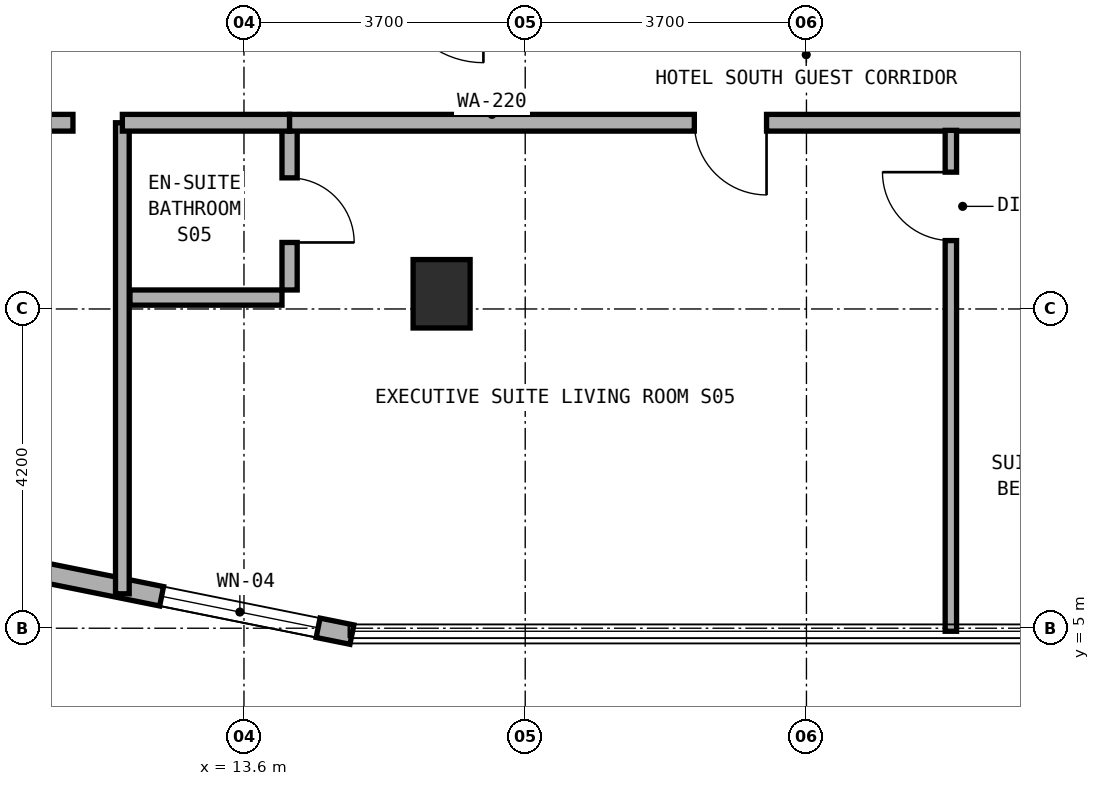
"""IFC4 building model, lengths in metres.
Left out: names, types, materials, properties, quantities, classifications, styles, units other than length and angle.
Written with IfcOpenShell. Run it as: python <this file> out.ifc"""

import sys

from ifc_helpers import new_model, si_unit, direction, frame, frame_2d, origin, origin_2d, place, context, subcontext, project, spatial, rectangle, extrude, element, fill, save


model = new_model("IFC4")
c1 = context("Model", 3, precision=1e-05, world=origin(), true_north=direction((0.0, 1.0)))
c2 = subcontext(c1, "Body", "Model", "MODEL_VIEW")
j1 = project(units=[si_unit("LENGTHUNIT", "METRE"), si_unit("PLANEANGLEUNIT", "RADIAN")], contexts=[c1])
p1 = place(None, origin())
s1 = spatial("IfcSite", under=j1, at=p1, CompositionType="ELEMENT")
p2 = place(p1, origin())
s2 = spatial("IfcBuilding", under=s1, at=p2, CompositionType="ELEMENT")
p3 = place(p2, frame((0.0, 0.0, 159.0)))
s3 = spatial("IfcBuildingStorey", under=s2, at=p3, CompositionType="ELEMENT", Elevation=159.0)
p4 = place(p3, frame((16.2, 9.4, 0.0), z_axis=(0.0, 0.0, 1.0), x_axis=(1.0, 0.0, 0.0)))
e1 = element("IfcColumn", 1, at=p4, inside=s3, PredefinedType="COLUMN", context=c2, shape_type="SweptSolid", body=[
    extrude(rectangle(XDim=0.75, YDim=0.9, at=origin_2d()), origin(), (0.0, 0.0, 1.0), 3.5),
])
p5 = place(p3, frame((6.018, 6.729, 0.0), z_axis=(0.0, 0.0, 1.0), x_axis=(0.980315963543, -0.197435082048, 0.0)))
e2 = element("IfcWall", 2, at=p5, inside=s3, PredefinedType="STANDARD", context=c2, shape_type="SweptSolid", body=[
    extrude(rectangle(XDim=9.183, YDim=0.26, at=frame_2d((4.591, 0.0))), origin(), (0.0, 0.0, 1.0), 3.22),
])
p6 = place(p5, frame((2.211, 0.0, 0.85)))
e3 = element("IfcOpeningElement", 3, at=p6, cuts=e2, PredefinedType="OPENING", context=c2, shape_type="SweptSolid", body=[
    extrude(rectangle(XDim=2.1, YDim=1.5, at=frame_2d((1.05, 0.75))), frame((0.0, 0.14, 0.0), z_axis=(0.0, -1.0, 0.0), x_axis=(1.0, 0.0, 0.0)), (0.0, 0.0, 1.0), 0.28),
])
p7 = place(p5, frame((6.629, 0.0, 0.85)))
e4 = element("IfcOpeningElement", 4, at=p7, cuts=e2, PredefinedType="OPENING", context=c2, shape_type="SweptSolid", body=[
    extrude(rectangle(XDim=2.1, YDim=1.5, at=frame_2d((1.05, 0.75))), frame((0.0, 0.14, 0.0), z_axis=(0.0, -1.0, 0.0), x_axis=(1.0, 0.0, 0.0)), (0.0, 0.0, 1.0), 0.28),
])
p8 = place(p3, frame((6.93, 11.65, 0.0), z_axis=(0.0, 0.0, 1.0), x_axis=(1.0, 0.0, 0.0)))
e5 = element("IfcWall", 5, at=p8, inside=s3, PredefinedType="SOLIDWALL", context=c2, shape_type="SweptSolid", body=[
    extrude(rectangle(XDim=4.42, YDim=0.22, at=frame_2d((2.21, 0.0))), origin(), (0.0, 0.0, 1.0), 2.795),
])
p9 = place(p8, frame((1.484, 0.0, 0.0)))
e6 = element("IfcOpeningElement", 6, at=p9, cuts=e5, PredefinedType="OPENING", context=c2, shape_type="SweptSolid", body=[
    extrude(rectangle(XDim=1.1, YDim=2.1, at=frame_2d((0.55, 1.05))), frame((0.0, 0.12, 0.0), z_axis=(0.0, -1.0, 0.0), x_axis=(1.0, 0.0, 0.0)), (0.0, 0.0, 1.0), 0.24),
])
p10 = place(p3, frame((12.0, 5.453, 0.0), z_axis=(0.0, 0.0, 1.0), x_axis=(0.0, 1.0, 0.0)))
e7 = element("IfcWall", 7, at=p10, inside=s3, PredefinedType="SOLIDWALL", context=c2, shape_type="SweptSolid", body=[
    extrude(rectangle(XDim=6.197, YDim=0.18, at=frame_2d((3.099, 0.0))), origin(), (0.0, 0.0, 1.0), 2.835),
])
p11 = place(p3, frame((14.2, 9.45, 0.0), z_axis=(0.0, 0.0, 1.0), x_axis=(0.0, 1.0, 0.0)))
e8 = element("IfcWall", 8, at=p11, inside=s3, PredefinedType="PLUMBINGWALL", context=c2, shape_type="SweptSolid", body=[
    extrude(rectangle(XDim=2.1, YDim=0.2, at=frame_2d((1.05, 0.0))), origin(), (0.0, 0.0, 1.0), 2.835),
])
p12 = place(p11, frame((0.625, 0.0, 0.0)))
e9 = element("IfcOpeningElement", 9, at=p12, cuts=e8, PredefinedType="OPENING", context=c2, shape_type="SweptSolid", body=[
    extrude(rectangle(XDim=0.85, YDim=2.1, at=frame_2d((0.425, 1.05))), frame((0.0, 0.11, 0.0), z_axis=(0.0, -1.0, 0.0), x_axis=(1.0, 0.0, 0.0)), (0.0, 0.0, 1.0), 0.22),
])
p13 = place(p3, frame((12.1, 9.35, 0.0), z_axis=(0.0, 0.0, 1.0), x_axis=(1.0, 0.0, 0.0)))
e10 = element("IfcWall", 10, at=p13, inside=s3, PredefinedType="PLUMBINGWALL", context=c2, shape_type="SweptSolid", body=[
    extrude(rectangle(XDim=2.0, YDim=0.2, at=frame_2d((1.0, 0.0))), origin(), (0.0, 0.0, 1.0), 2.835),
])
p14 = place(p3, frame((12.0, 11.65, 0.0), z_axis=(0.0, 0.0, 1.0), x_axis=(1.0, 0.0, 0.0)))
e11 = element("IfcWall", 11, at=p14, inside=s3, PredefinedType="SOLIDWALL", context=c2, shape_type="SweptSolid", body=[
    extrude(rectangle(XDim=2.2, YDim=0.22, at=frame_2d((1.1, 0.0))), origin(), (0.0, 0.0, 1.0), 3.22),
])
p15 = place(p3, frame((14.2, 11.65, 0.0), z_axis=(0.0, 0.0, 1.0), x_axis=(1.0, 0.0, 0.0)))
e12 = element("IfcWall", 12, at=p15, inside=s3, PredefinedType="SOLIDWALL", context=c2, shape_type="SweptSolid", body=[
    extrude(rectangle(XDim=11.6, YDim=0.22, at=frame_2d((5.8, 0.0))), origin(), (0.0, 0.0, 1.0), 2.795),
])
p16 = place(p15, frame((5.325, 0.0, 0.0)))
e13 = element("IfcOpeningElement", 13, at=p16, cuts=e12, PredefinedType="OPENING", context=c2, shape_type="SweptSolid", body=[
    extrude(rectangle(XDim=0.95, YDim=2.1, at=frame_2d((0.475, 1.05))), frame((0.0, 0.12, 0.0), z_axis=(0.0, -1.0, 0.0), x_axis=(1.0, 0.0, 0.0)), (0.0, 0.0, 1.0), 0.24),
])
p17 = place(p3, frame((22.9, 4.96, 0.0), z_axis=(0.0, 0.0, 1.0), x_axis=(0.0, 1.0, 0.0)))
e14 = element("IfcWall", 14, at=p17, inside=s3, PredefinedType="PARTITIONING", context=c2, shape_type="SweptSolid", body=[
    extrude(rectangle(XDim=6.59, YDim=0.15, at=frame_2d((3.295, 0.0))), origin(), (0.0, 0.0, 1.0), 2.835),
])
p18 = place(p17, frame((5.14, 0.0, 0.0)))
e15 = element("IfcOpeningElement", 15, at=p18, cuts=e14, PredefinedType="OPENING", context=c2, shape_type="SweptSolid", body=[
    extrude(rectangle(XDim=0.9, YDim=2.1, at=frame_2d((0.45, 1.05))), frame((0.0, 0.085, 0.0), z_axis=(0.0, -1.0, 0.0), x_axis=(1.0, 0.0, 0.0)), (0.0, 0.0, 1.0), 0.17),
])
p19 = place(p7, origin())
e16 = element("IfcWindow", 16, at=p19, inside=s3, PartitioningType="SINGLE_PANEL", PredefinedType="WINDOW", context=c2, shape_type="SweptSolid", body=[
    extrude(rectangle(XDim=2.1, YDim=1.5, at=frame_2d((1.05, 0.75))), frame((0.0, 0.03, 0.0), z_axis=(0.0, -1.0, 0.0), x_axis=(1.0, 0.0, 0.0)), (0.0, 0.0, 1.0), 0.06),
])
fill(e4, e16)
p20 = place(p12, frame((0.85, 0.0, 0.0), z_axis=(0.0, 0.0, 1.0), x_axis=(-1.0, 0.0, 0.0)))
e17 = element("IfcDoor", 17, at=p20, inside=s3, OperationType="SINGLE_SWING_RIGHT", PredefinedType="DOOR", context=c2, shape_type="SweptSolid", body=[
    extrude(rectangle(XDim=0.85, YDim=2.1, at=frame_2d((0.425, 1.05))), frame((0.0, 0.025, 0.0), z_axis=(0.0, -1.0, 0.0), x_axis=(1.0, 0.0, 0.0)), (0.0, 0.0, 1.0), 0.05),
])
fill(e9, e17)
p21 = place(p16, frame((0.95, 0.0, 0.0), z_axis=(0.0, 0.0, 1.0), x_axis=(-1.0, 0.0, 0.0)))
e18 = element("IfcDoor", 18, at=p21, inside=s3, OperationType="SINGLE_SWING_LEFT", PredefinedType="DOOR", context=c2, shape_type="SweptSolid", body=[
    extrude(rectangle(XDim=0.95, YDim=2.1, at=frame_2d((0.475, 1.05))), frame((0.0, 0.025, 0.0), z_axis=(0.0, -1.0, 0.0), x_axis=(1.0, 0.0, 0.0)), (0.0, 0.0, 1.0), 0.05),
])
fill(e13, e18)
p22 = place(p18, origin())
e19 = element("IfcDoor", 19, at=p22, inside=s3, OperationType="SINGLE_SWING_RIGHT", PredefinedType="DOOR", context=c2, shape_type="SweptSolid", body=[
    extrude(rectangle(XDim=0.9, YDim=2.1, at=frame_2d((0.45, 1.05))), frame((0.0, 0.025, 0.0), z_axis=(0.0, -1.0, 0.0), x_axis=(1.0, 0.0, 0.0)), (0.0, 0.0, 1.0), 0.05),
])
fill(e15, e19)
save(model, sys.argv[1])
